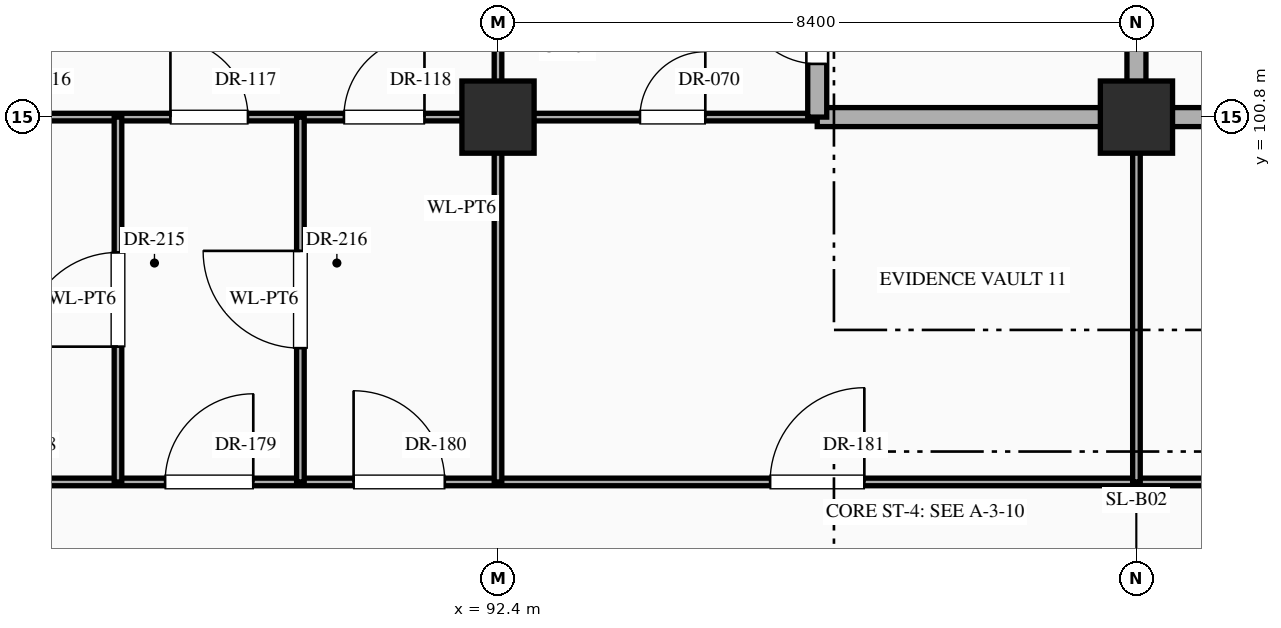
"""IFC4 building model, lengths in metres.
Left out: names, types, materials, properties, quantities, classifications, styles, units other than length and angle.
Written with IfcOpenShell. Run it as: python <this file> out.ifc"""

import sys

from ifc_helpers import new_model, si_unit, direction, frame, frame_2d, origin, origin_2d, place, context, subcontext, project, spatial, rectangle, extrude, element, fill, save


model = new_model("IFC4")
c1 = context("Model", 3, precision=1e-05, world=origin(), true_north=direction((0.0, 1.0)))
c2 = subcontext(c1, "Body", "Model", "MODEL_VIEW")
j1 = project(units=[si_unit("LENGTHUNIT", "METRE"), si_unit("PLANEANGLEUNIT", "RADIAN")], contexts=[c1])
p1 = place(None, origin())
s1 = spatial("IfcSite", under=j1, at=p1, CompositionType="ELEMENT")
p2 = place(p1, origin())
s2 = spatial("IfcBuilding", under=s1, at=p2, CompositionType="ELEMENT")
p3 = place(p2, frame((0.0, 0.0, -10.2)))
s3 = spatial("IfcBuildingStorey", under=s2, at=p3, CompositionType="ELEMENT", Elevation=-10.2)
for number, where, z_axis, x_axis in (
    (1, (92.4, 100.8, 0.0), (0.0, 0.0, 1.0), (1.0, 0.0, 0.0)),
    (2, (100.8, 100.8, 0.0), (0.0, 0.0, 1.0), (1.0, 0.0, 0.0)),
):
    element("IfcColumn", number, at=place(p3, frame(where, z_axis=z_axis, x_axis=x_axis)), inside=s3, PredefinedType="COLUMN", context=c2, shape_type="SweptSolid", body=[
        extrude(rectangle(XDim=0.95, YDim=0.95, at=origin_2d()), origin(), (0.0, 0.0, 1.0), 4.8),
    ])
p4 = place(p3, frame((0.04, 96.0, 0.0), z_axis=(0.0, 0.0, 1.0), x_axis=(1.0, 0.0, 0.0)))
e3 = element("IfcWall", 3, at=p4, inside=s3, PredefinedType="STANDARD", context=c2, shape_type="SweptSolid", body=[
    extrude(rectangle(XDim=151.16, YDim=0.1, at=frame_2d((75.58, 0.0))), origin(), (0.0, 0.0, 1.0), 4.48),
])
p5 = place(p4, frame((1.04, 0.0, 0.0)))
e4 = element("IfcOpeningElement", 4, at=p5, cuts=e3, PredefinedType="OPENING", context=c2, shape_type="SweptSolid", body=[
    extrude(rectangle(XDim=1.28, YDim=2.35, at=frame_2d((0.64, 1.175))), frame((0.0, 0.062, 0.0), z_axis=(0.0, -1.0, 0.0), x_axis=(1.0, 0.0, 0.0)), (0.0, 0.0, 1.0), 0.124),
])
p6 = place(p4, frame((4.09, 0.0, 0.0)))
e5 = element("IfcOpeningElement", 5, at=p6, cuts=e3, PredefinedType="OPENING", context=c2, shape_type="SweptSolid", body=[
    extrude(rectangle(XDim=0.94, YDim=2.3, at=frame_2d((0.47, 1.15))), frame((0.0, 0.062, 0.0), z_axis=(0.0, -1.0, 0.0), x_axis=(1.0, 0.0, 0.0)), (0.0, 0.0, 1.0), 0.124),
])
p7 = place(p4, frame((6.57, 0.0, 0.0)))
e6 = element("IfcOpeningElement", 6, at=p7, cuts=e3, PredefinedType="OPENING", context=c2, shape_type="SweptSolid", body=[
    extrude(rectangle(XDim=0.98, YDim=2.35, at=frame_2d((0.49, 1.175))), frame((0.0, 0.062, 0.0), z_axis=(0.0, -1.0, 0.0), x_axis=(1.0, 0.0, 0.0)), (0.0, 0.0, 1.0), 0.124),
])
p8 = place(p4, frame((12.05, 0.0, 0.0)))
e7 = element("IfcOpeningElement", 7, at=p8, cuts=e3, PredefinedType="OPENING", context=c2, shape_type="SweptSolid", body=[
    extrude(rectangle(XDim=1.02, YDim=2.4, at=frame_2d((0.51, 1.2))), frame((0.0, 0.062, 0.0), z_axis=(0.0, -1.0, 0.0), x_axis=(1.0, 0.0, 0.0)), (0.0, 0.0, 1.0), 0.124),
])
p9 = place(p4, frame((20.43, 0.0, 0.0)))
e8 = element("IfcOpeningElement", 8, at=p9, cuts=e3, PredefinedType="OPENING", context=c2, shape_type="SweptSolid", body=[
    extrude(rectangle(XDim=1.06, YDim=2.4, at=frame_2d((0.53, 1.2))), frame((0.0, 0.062, 0.0), z_axis=(0.0, -1.0, 0.0), x_axis=(1.0, 0.0, 0.0)), (0.0, 0.0, 1.0), 0.124),
])
p10 = place(p4, frame((26.29, 0.0, 0.0)))
e9 = element("IfcOpeningElement", 9, at=p10, cuts=e3, PredefinedType="OPENING", context=c2, shape_type="SweptSolid", body=[
    extrude(rectangle(XDim=1.14, YDim=2.4, at=frame_2d((0.57, 1.2))), frame((0.0, 0.062, 0.0), z_axis=(0.0, -1.0, 0.0), x_axis=(1.0, 0.0, 0.0)), (0.0, 0.0, 1.0), 0.124),
])
p11 = place(p4, frame((29.31, 0.0, 0.0)))
e10 = element("IfcOpeningElement", 10, at=p11, cuts=e3, PredefinedType="OPENING", context=c2, shape_type="SweptSolid", body=[
    extrude(rectangle(XDim=0.9, YDim=2.15, at=frame_2d((0.45, 1.075))), frame((0.0, 0.062, 0.0), z_axis=(0.0, -1.0, 0.0), x_axis=(1.0, 0.0, 0.0)), (0.0, 0.0, 1.0), 0.124),
])
p12 = place(p4, frame((31.83, 0.0, 0.0)))
e11 = element("IfcOpeningElement", 11, at=p12, cuts=e3, PredefinedType="OPENING", context=c2, shape_type="SweptSolid", body=[
    extrude(rectangle(XDim=0.86, YDim=2.1, at=frame_2d((0.43, 1.05))), frame((0.0, 0.062, 0.0), z_axis=(0.0, -1.0, 0.0), x_axis=(1.0, 0.0, 0.0)), (0.0, 0.0, 1.0), 0.124),
])
p13 = place(p4, frame((37.3, 0.0, 0.0)))
e12 = element("IfcOpeningElement", 12, at=p13, cuts=e3, PredefinedType="OPENING", context=c2, shape_type="SweptSolid", body=[
    extrude(rectangle(XDim=0.92, YDim=2.15, at=frame_2d((0.46, 1.075))), frame((0.0, 0.062, 0.0), z_axis=(0.0, -1.0, 0.0), x_axis=(1.0, 0.0, 0.0)), (0.0, 0.0, 1.0), 0.124),
])
p14 = place(p4, frame((45.68, 0.0, 0.0)))
e13 = element("IfcOpeningElement", 13, at=p14, cuts=e3, PredefinedType="OPENING", context=c2, shape_type="SweptSolid", body=[
    extrude(rectangle(XDim=0.96, YDim=2.2, at=frame_2d((0.48, 1.1))), frame((0.0, 0.062, 0.0), z_axis=(0.0, -1.0, 0.0), x_axis=(1.0, 0.0, 0.0)), (0.0, 0.0, 1.0), 0.124),
])
p15 = place(p4, frame((51.57, 0.0, 0.0)))
e14 = element("IfcOpeningElement", 14, at=p15, cuts=e3, PredefinedType="OPENING", context=c2, shape_type="SweptSolid", body=[
    extrude(rectangle(XDim=0.98, YDim=2.35, at=frame_2d((0.49, 1.175))), frame((0.0, 0.062, 0.0), z_axis=(0.0, -1.0, 0.0), x_axis=(1.0, 0.0, 0.0)), (0.0, 0.0, 1.0), 0.124),
])
p16 = place(p4, frame((54.45, 0.0, 0.0)))
e15 = element("IfcOpeningElement", 15, at=p16, cuts=e3, PredefinedType="OPENING", context=c2, shape_type="SweptSolid", body=[
    extrude(rectangle(XDim=1.02, YDim=2.4, at=frame_2d((0.51, 1.2))), frame((0.0, 0.062, 0.0), z_axis=(0.0, -1.0, 0.0), x_axis=(1.0, 0.0, 0.0)), (0.0, 0.0, 1.0), 0.124),
])
p17 = place(p4, frame((56.93, 0.0, 0.0)))
e16 = element("IfcOpeningElement", 16, at=p17, cuts=e3, PredefinedType="OPENING", context=c2, shape_type="SweptSolid", body=[
    extrude(rectangle(XDim=1.06, YDim=2.4, at=frame_2d((0.53, 1.2))), frame((0.0, 0.062, 0.0), z_axis=(0.0, -1.0, 0.0), x_axis=(1.0, 0.0, 0.0)), (0.0, 0.0, 1.0), 0.124),
])
p18 = place(p4, frame((62.39, 0.0, 0.0)))
e17 = element("IfcOpeningElement", 17, at=p18, cuts=e3, PredefinedType="OPENING", context=c2, shape_type="SweptSolid", body=[
    extrude(rectangle(XDim=1.14, YDim=2.4, at=frame_2d((0.57, 1.2))), frame((0.0, 0.062, 0.0), z_axis=(0.0, -1.0, 0.0), x_axis=(1.0, 0.0, 0.0)), (0.0, 0.0, 1.0), 0.124),
])
p19 = place(p4, frame((70.91, 0.0, 0.0)))
e18 = element("IfcOpeningElement", 18, at=p19, cuts=e3, PredefinedType="OPENING", context=c2, shape_type="SweptSolid", body=[
    extrude(rectangle(XDim=0.9, YDim=2.15, at=frame_2d((0.45, 1.075))), frame((0.0, 0.062, 0.0), z_axis=(0.0, -1.0, 0.0), x_axis=(1.0, 0.0, 0.0)), (0.0, 0.0, 1.0), 0.124),
])
p20 = place(p4, frame((79.33, 0.0, 0.0)))
e19 = element("IfcOpeningElement", 19, at=p20, cuts=e3, PredefinedType="OPENING", context=c2, shape_type="SweptSolid", body=[
    extrude(rectangle(XDim=0.86, YDim=2.1, at=frame_2d((0.43, 1.05))), frame((0.0, 0.062, 0.0), z_axis=(0.0, -1.0, 0.0), x_axis=(1.0, 0.0, 0.0)), (0.0, 0.0, 1.0), 0.124),
])
p21 = place(p4, frame((85.1, 0.0, 0.0)))
e20 = element("IfcOpeningElement", 20, at=p21, cuts=e3, PredefinedType="OPENING", context=c2, shape_type="SweptSolid", body=[
    extrude(rectangle(XDim=1.12, YDim=2.25, at=frame_2d((0.56, 1.125))), frame((0.0, 0.062, 0.0), z_axis=(0.0, -1.0, 0.0), x_axis=(1.0, 0.0, 0.0)), (0.0, 0.0, 1.0), 0.124),
])
p22 = place(p4, frame((87.98, 0.0, 0.0)))
e21 = element("IfcOpeningElement", 21, at=p22, cuts=e3, PredefinedType="OPENING", context=c2, shape_type="SweptSolid", body=[
    extrude(rectangle(XDim=1.16, YDim=2.3, at=frame_2d((0.58, 1.15))), frame((0.0, 0.062, 0.0), z_axis=(0.0, -1.0, 0.0), x_axis=(1.0, 0.0, 0.0)), (0.0, 0.0, 1.0), 0.124),
])
p23 = place(p4, frame((90.46, 0.0, 0.0)))
e22 = element("IfcOpeningElement", 22, at=p23, cuts=e3, PredefinedType="OPENING", context=c2, shape_type="SweptSolid", body=[
    extrude(rectangle(XDim=1.2, YDim=2.35, at=frame_2d((0.6, 1.175))), frame((0.0, 0.062, 0.0), z_axis=(0.0, -1.0, 0.0), x_axis=(1.0, 0.0, 0.0)), (0.0, 0.0, 1.0), 0.124),
])
p24 = place(p4, frame((95.94, 0.0, 0.0)))
e23 = element("IfcOpeningElement", 23, at=p24, cuts=e3, PredefinedType="OPENING", context=c2, shape_type="SweptSolid", body=[
    extrude(rectangle(XDim=1.24, YDim=2.3, at=frame_2d((0.62, 1.15))), frame((0.0, 0.062, 0.0), z_axis=(0.0, -1.0, 0.0), x_axis=(1.0, 0.0, 0.0)), (0.0, 0.0, 1.0), 0.124),
])
p25 = place(p4, frame((104.32, 0.0, 0.0)))
e24 = element("IfcOpeningElement", 24, at=p25, cuts=e3, PredefinedType="OPENING", context=c2, shape_type="SweptSolid", body=[
    extrude(rectangle(XDim=1.28, YDim=2.35, at=frame_2d((0.64, 1.175))), frame((0.0, 0.062, 0.0), z_axis=(0.0, -1.0, 0.0), x_axis=(1.0, 0.0, 0.0)), (0.0, 0.0, 1.0), 0.124),
])
p26 = place(p4, frame((110.39, 0.0, 0.0)))
e25 = element("IfcOpeningElement", 25, at=p26, cuts=e3, PredefinedType="OPENING", context=c2, shape_type="SweptSolid", body=[
    extrude(rectangle(XDim=0.94, YDim=2.3, at=frame_2d((0.47, 1.15))), frame((0.0, 0.062, 0.0), z_axis=(0.0, -1.0, 0.0), x_axis=(1.0, 0.0, 0.0)), (0.0, 0.0, 1.0), 0.124),
])
p27 = place(p4, frame((113.27, 0.0, 0.0)))
e26 = element("IfcOpeningElement", 26, at=p27, cuts=e3, PredefinedType="OPENING", context=c2, shape_type="SweptSolid", body=[
    extrude(rectangle(XDim=0.98, YDim=2.35, at=frame_2d((0.49, 1.175))), frame((0.0, 0.062, 0.0), z_axis=(0.0, -1.0, 0.0), x_axis=(1.0, 0.0, 0.0)), (0.0, 0.0, 1.0), 0.124),
])
p28 = place(p4, frame((115.75, 0.0, 0.0)))
e27 = element("IfcOpeningElement", 27, at=p28, cuts=e3, PredefinedType="OPENING", context=c2, shape_type="SweptSolid", body=[
    extrude(rectangle(XDim=1.02, YDim=2.4, at=frame_2d((0.51, 1.2))), frame((0.0, 0.062, 0.0), z_axis=(0.0, -1.0, 0.0), x_axis=(1.0, 0.0, 0.0)), (0.0, 0.0, 1.0), 0.124),
])
p29 = place(p4, frame((121.24, 0.0, 0.0)))
e28 = element("IfcOpeningElement", 28, at=p29, cuts=e3, PredefinedType="OPENING", context=c2, shape_type="SweptSolid", body=[
    extrude(rectangle(XDim=1.04, YDim=2.2, at=frame_2d((0.52, 1.1))), frame((0.0, 0.062, 0.0), z_axis=(0.0, -1.0, 0.0), x_axis=(1.0, 0.0, 0.0)), (0.0, 0.0, 1.0), 0.124),
])
p30 = place(p4, frame((129.62, 0.0, 0.0)))
e29 = element("IfcOpeningElement", 29, at=p30, cuts=e3, PredefinedType="OPENING", context=c2, shape_type="SweptSolid", body=[
    extrude(rectangle(XDim=1.08, YDim=2.25, at=frame_2d((0.54, 1.125))), frame((0.0, 0.062, 0.0), z_axis=(0.0, -1.0, 0.0), x_axis=(1.0, 0.0, 0.0)), (0.0, 0.0, 1.0), 0.124),
])
p31 = place(p4, frame((135.5, 0.0, 0.0)))
e30 = element("IfcOpeningElement", 30, at=p31, cuts=e3, PredefinedType="OPENING", context=c2, shape_type="SweptSolid", body=[
    extrude(rectangle(XDim=1.12, YDim=2.25, at=frame_2d((0.56, 1.125))), frame((0.0, 0.062, 0.0), z_axis=(0.0, -1.0, 0.0), x_axis=(1.0, 0.0, 0.0)), (0.0, 0.0, 1.0), 0.124),
])
p32 = place(p4, frame((138.38, 0.0, 0.0)))
e31 = element("IfcOpeningElement", 31, at=p32, cuts=e3, PredefinedType="OPENING", context=c2, shape_type="SweptSolid", body=[
    extrude(rectangle(XDim=1.16, YDim=2.3, at=frame_2d((0.58, 1.15))), frame((0.0, 0.062, 0.0), z_axis=(0.0, -1.0, 0.0), x_axis=(1.0, 0.0, 0.0)), (0.0, 0.0, 1.0), 0.124),
])
p33 = place(p4, frame((140.86, 0.0, 0.0)))
e32 = element("IfcOpeningElement", 32, at=p33, cuts=e3, PredefinedType="OPENING", context=c2, shape_type="SweptSolid", body=[
    extrude(rectangle(XDim=1.2, YDim=2.35, at=frame_2d((0.6, 1.175))), frame((0.0, 0.062, 0.0), z_axis=(0.0, -1.0, 0.0), x_axis=(1.0, 0.0, 0.0)), (0.0, 0.0, 1.0), 0.124),
])
p34 = place(p4, frame((146.34, 0.0, 0.0)))
e33 = element("IfcOpeningElement", 33, at=p34, cuts=e3, PredefinedType="OPENING", context=c2, shape_type="SweptSolid", body=[
    extrude(rectangle(XDim=1.24, YDim=2.3, at=frame_2d((0.62, 1.15))), frame((0.0, 0.062, 0.0), z_axis=(0.0, -1.0, 0.0), x_axis=(1.0, 0.0, 0.0)), (0.0, 0.0, 1.0), 0.124),
])
p35 = place(p3, frame((71.4, 100.8, 0.0), z_axis=(0.0, 0.0, 1.0), x_axis=(1.0, 0.0, 0.0)))
e34 = element("IfcWall", 34, at=p35, inside=s3, PredefinedType="STANDARD", context=c2, shape_type="SweptSolid", body=[
    extrude(rectangle(XDim=25.2, YDim=0.1, at=frame_2d((12.6, 0.0))), origin(), (0.0, 0.0, 1.0), 3.63),
])
p36 = place(p35, frame((1.413, 0.0, 0.0)))
e35 = element("IfcOpeningElement", 35, at=p36, cuts=e34, PredefinedType="OPENING", context=c2, shape_type="SweptSolid", body=[
    extrude(rectangle(XDim=0.98, YDim=2.35, at=frame_2d((0.49, 1.175))), frame((0.0, 0.062, 0.0), z_axis=(0.0, -1.0, 0.0), x_axis=(1.0, 0.0, 0.0)), (0.0, 0.0, 1.0), 0.124),
])
p37 = place(p35, frame((22.867, 0.0, 0.0)))
e36 = element("IfcOpeningElement", 36, at=p37, cuts=e34, PredefinedType="OPENING", context=c2, shape_type="SweptSolid", body=[
    extrude(rectangle(XDim=0.86, YDim=2.1, at=frame_2d((0.43, 1.05))), frame((0.0, 0.062, 0.0), z_axis=(0.0, -1.0, 0.0), x_axis=(1.0, 0.0, 0.0)), (0.0, 0.0, 1.0), 0.124),
])
p38 = place(p35, frame((7.84, 0.0, 0.0)))
e37 = element("IfcOpeningElement", 37, at=p38, cuts=e34, PredefinedType="OPENING", context=c2, shape_type="SweptSolid", body=[
    extrude(rectangle(XDim=1.12, YDim=2.25, at=frame_2d((0.56, 1.125))), frame((0.0, 0.062, 0.0), z_axis=(0.0, -1.0, 0.0), x_axis=(1.0, 0.0, 0.0)), (0.0, 0.0, 1.0), 0.124),
])
p39 = place(p35, frame((14.008, 0.0, 0.0)))
e38 = element("IfcOpeningElement", 38, at=p39, cuts=e34, PredefinedType="OPENING", context=c2, shape_type="SweptSolid", body=[
    extrude(rectangle(XDim=0.98, YDim=2.35, at=frame_2d((0.49, 1.175))), frame((0.0, 0.062, 0.0), z_axis=(0.0, -1.0, 0.0), x_axis=(1.0, 0.0, 0.0)), (0.0, 0.0, 1.0), 0.124),
])
p40 = place(p35, frame((16.69, 0.0, 0.0)))
e39 = element("IfcOpeningElement", 39, at=p40, cuts=e34, PredefinedType="OPENING", context=c2, shape_type="SweptSolid", body=[
    extrude(rectangle(XDim=1.02, YDim=2.4, at=frame_2d((0.51, 1.2))), frame((0.0, 0.062, 0.0), z_axis=(0.0, -1.0, 0.0), x_axis=(1.0, 0.0, 0.0)), (0.0, 0.0, 1.0), 0.124),
])
p41 = place(p35, frame((18.972, 0.0, 0.0)))
e40 = element("IfcOpeningElement", 40, at=p41, cuts=e34, PredefinedType="OPENING", context=c2, shape_type="SweptSolid", body=[
    extrude(rectangle(XDim=1.06, YDim=2.4, at=frame_2d((0.53, 1.2))), frame((0.0, 0.062, 0.0), z_axis=(0.0, -1.0, 0.0), x_axis=(1.0, 0.0, 0.0)), (0.0, 0.0, 1.0), 0.124),
])
p42 = place(p3, frame((96.6, 100.8, 0.0), z_axis=(0.0, 0.0, 1.0), x_axis=(1.0, 0.0, 0.0)))
e41 = element("IfcWall", 41, at=p42, inside=s3, PredefinedType="STANDARD", context=c2, shape_type="SweptSolid", body=[
    extrude(rectangle(XDim=12.6, YDim=0.25, at=frame_2d((6.3, 0.0))), origin(), (0.0, 0.0, 1.0), 3.63),
])
p43 = place(p42, frame((7.9, 0.0, 0.0)))
e42 = element("IfcOpeningElement", 42, at=p43, cuts=e41, PredefinedType="OPENING", context=c2, shape_type="SweptSolid", body=[
    extrude(rectangle(XDim=1.0, YDim=2.2, at=frame_2d((0.5, 1.1))), frame((0.0, 0.137, 0.0), z_axis=(0.0, -1.0, 0.0), x_axis=(1.0, 0.0, 0.0)), (0.0, 0.0, 1.0), 0.274),
])
p44 = place(p3, frame((87.4, 96.0, 0.0), z_axis=(0.0, 0.0, 1.0), x_axis=(0.0, 1.0, 0.0)))
e43 = element("IfcWall", 43, at=p44, inside=s3, PredefinedType="STANDARD", context=c2, shape_type="SweptSolid", body=[
    extrude(rectangle(XDim=4.8, YDim=0.1, at=frame_2d((2.4, 0.0))), origin(), (0.0, 0.0, 1.0), 4.48),
])
p45 = place(p44, frame((1.78, 0.0, 0.0)))
e44 = element("IfcOpeningElement", 44, at=p45, cuts=e43, PredefinedType="OPENING", context=c2, shape_type="SweptSolid", body=[
    extrude(rectangle(XDim=1.24, YDim=2.3, at=frame_2d((0.62, 1.15))), frame((0.0, 0.062, 0.0), z_axis=(0.0, -1.0, 0.0), x_axis=(1.0, 0.0, 0.0)), (0.0, 0.0, 1.0), 0.124),
])
p46 = place(p3, frame((89.8, 96.0, 0.0), z_axis=(0.0, 0.0, 1.0), x_axis=(0.0, 1.0, 0.0)))
e45 = element("IfcWall", 45, at=p46, inside=s3, PredefinedType="STANDARD", context=c2, shape_type="SweptSolid", body=[
    extrude(rectangle(XDim=4.8, YDim=0.1, at=frame_2d((2.4, 0.0))), origin(), (0.0, 0.0, 1.0), 4.48),
])
p47 = place(p46, frame((1.76, 0.0, 0.0)))
e46 = element("IfcOpeningElement", 46, at=p47, cuts=e45, PredefinedType="OPENING", context=c2, shape_type="SweptSolid", body=[
    extrude(rectangle(XDim=1.28, YDim=2.35, at=frame_2d((0.64, 1.175))), frame((0.0, 0.062, 0.0), z_axis=(0.0, -1.0, 0.0), x_axis=(1.0, 0.0, 0.0)), (0.0, 0.0, 1.0), 0.124),
])
p48 = place(p3, frame((92.4, 96.0, 0.0), z_axis=(0.0, 0.0, 1.0), x_axis=(0.0, 1.0, 0.0)))
e47 = element("IfcWall", 47, at=p48, inside=s3, PredefinedType="STANDARD", context=c2, shape_type="SweptSolid", body=[
    extrude(rectangle(XDim=7.2, YDim=0.1, at=frame_2d((3.6, 0.0))), origin(), (0.0, 0.0, 1.0), 3.73),
])
p49 = place(p48, frame((5.748, 0.0, 0.0)))
e48 = element("IfcOpeningElement", 48, at=p49, cuts=e47, PredefinedType="OPENING", context=c2, shape_type="SweptSolid", body=[
    extrude(rectangle(XDim=0.9, YDim=2.15, at=frame_2d((0.45, 1.075))), frame((0.0, 0.062, 0.0), z_axis=(0.0, -1.0, 0.0), x_axis=(1.0, 0.0, 0.0)), (0.0, 0.0, 1.0), 0.124),
])
p50 = place(p3, frame((96.6, 100.8, 0.0), z_axis=(0.0, 0.0, 1.0), x_axis=(0.0, 1.0, 0.0)))
e49 = element("IfcWall", 49, at=p50, inside=s3, PredefinedType="STANDARD", context=c2, shape_type="SweptSolid", body=[
    extrude(rectangle(XDim=3.6, YDim=0.25, at=frame_2d((1.8, 0.0))), origin(), (0.0, 0.0, 1.0), 4.48),
])
p51 = place(p50, frame((0.7, 0.0, 0.0)))
e50 = element("IfcOpeningElement", 50, at=p51, cuts=e49, PredefinedType="OPENING", context=c2, shape_type="SweptSolid", body=[
    extrude(rectangle(XDim=1.0, YDim=2.2, at=frame_2d((0.5, 1.1))), frame((0.0, 0.137, 0.0), z_axis=(0.0, -1.0, 0.0), x_axis=(1.0, 0.0, 0.0)), (0.0, 0.0, 1.0), 0.274),
])
p52 = place(p3, frame((100.8, 96.0, 0.0), z_axis=(0.0, 0.0, 1.0), x_axis=(0.0, 1.0, 0.0)))
e51 = element("IfcWall", 51, at=p52, inside=s3, PredefinedType="STANDARD", context=c2, shape_type="SweptSolid", body=[
    extrude(rectangle(XDim=4.8, YDim=0.1, at=frame_2d((2.4, 0.0))), origin(), (0.0, 0.0, 1.0), 3.73),
])
p53 = place(p3, frame((100.8, 100.8, 0.0), z_axis=(0.0, 0.0, 1.0), x_axis=(0.0, 1.0, 0.0)))
e52 = element("IfcWall", 52, at=p53, inside=s3, PredefinedType="STANDARD", context=c2, shape_type="SweptSolid", body=[
    extrude(rectangle(XDim=2.4, YDim=0.25, at=frame_2d((1.2, 0.0))), origin(), (0.0, 0.0, 1.0), 3.73),
])
p54 = place(p53, frame((0.923, 0.0, 0.0)))
e53 = element("IfcOpeningElement", 53, at=p54, cuts=e52, PredefinedType="OPENING", context=c2, shape_type="SweptSolid", body=[
    extrude(rectangle(XDim=0.95, YDim=2.15, at=frame_2d((0.475, 1.075))), frame((0.0, 0.137, 0.0), z_axis=(0.0, -1.0, 0.0), x_axis=(1.0, 0.0, 0.0)), (0.0, 0.0, 1.0), 0.274),
])
p55 = place(p51, origin())
e54 = element("IfcDoor", 54, at=p55, inside=s3, OperationType="SINGLE_SWING_RIGHT", PredefinedType="DOOR", context=c2, shape_type="SweptSolid", body=[
    extrude(rectangle(XDim=1.0, YDim=2.2, at=frame_2d((0.5, 1.1))), frame((0.0, 0.025, 0.0), z_axis=(0.0, -1.0, 0.0), x_axis=(1.0, 0.0, 0.0)), (0.0, 0.0, 1.0), 0.05),
])
fill(e50, e54)
p56 = place(p37, origin())
e55 = element("IfcDoor", 55, at=p56, inside=s3, OperationType="SINGLE_SWING_RIGHT", PredefinedType="DOOR", context=c2, shape_type="SweptSolid", body=[
    extrude(rectangle(XDim=0.86, YDim=2.1, at=frame_2d((0.43, 1.05))), frame((0.0, 0.025, 0.0), z_axis=(0.0, -1.0, 0.0), x_axis=(1.0, 0.0, 0.0)), (0.0, 0.0, 1.0), 0.05),
])
fill(e36, e55)
p57 = place(p40, origin())
e56 = element("IfcDoor", 56, at=p57, inside=s3, OperationType="SINGLE_SWING_LEFT", PredefinedType="DOOR", context=c2, shape_type="SweptSolid", body=[
    extrude(rectangle(XDim=1.02, YDim=2.4, at=frame_2d((0.51, 1.2))), frame((0.0, 0.025, 0.0), z_axis=(0.0, -1.0, 0.0), x_axis=(1.0, 0.0, 0.0)), (0.0, 0.0, 1.0), 0.05),
])
fill(e39, e56)
p58 = place(p41, origin())
e57 = element("IfcDoor", 57, at=p58, inside=s3, OperationType="SINGLE_SWING_RIGHT", PredefinedType="DOOR", context=c2, shape_type="SweptSolid", body=[
    extrude(rectangle(XDim=1.06, YDim=2.4, at=frame_2d((0.53, 1.2))), frame((0.0, 0.025, 0.0), z_axis=(0.0, -1.0, 0.0), x_axis=(1.0, 0.0, 0.0)), (0.0, 0.0, 1.0), 0.05),
])
fill(e40, e57)
p59 = place(p22, origin())
e58 = element("IfcDoor", 58, at=p59, inside=s3, OperationType="SINGLE_SWING_RIGHT", PredefinedType="DOOR", context=c2, shape_type="SweptSolid", body=[
    extrude(rectangle(XDim=1.16, YDim=2.3, at=frame_2d((0.58, 1.15))), frame((0.0, 0.025, 0.0), z_axis=(0.0, -1.0, 0.0), x_axis=(1.0, 0.0, 0.0)), (0.0, 0.0, 1.0), 0.05),
])
fill(e21, e58)
p60 = place(p23, origin())
e59 = element("IfcDoor", 59, at=p60, inside=s3, OperationType="SINGLE_SWING_LEFT", PredefinedType="DOOR", context=c2, shape_type="SweptSolid", body=[
    extrude(rectangle(XDim=1.2, YDim=2.35, at=frame_2d((0.6, 1.175))), frame((0.0, 0.025, 0.0), z_axis=(0.0, -1.0, 0.0), x_axis=(1.0, 0.0, 0.0)), (0.0, 0.0, 1.0), 0.05),
])
fill(e22, e59)
p61 = place(p24, origin())
e60 = element("IfcDoor", 60, at=p61, inside=s3, OperationType="SINGLE_SWING_RIGHT", PredefinedType="DOOR", context=c2, shape_type="SweptSolid", body=[
    extrude(rectangle(XDim=1.24, YDim=2.3, at=frame_2d((0.62, 1.15))), frame((0.0, 0.025, 0.0), z_axis=(0.0, -1.0, 0.0), x_axis=(1.0, 0.0, 0.0)), (0.0, 0.0, 1.0), 0.05),
])
fill(e23, e60)
p62 = place(p45, origin())
e61 = element("IfcDoor", 61, at=p62, inside=s3, OperationType="SINGLE_SWING_LEFT", PredefinedType="DOOR", context=c2, shape_type="SweptSolid", body=[
    extrude(rectangle(XDim=1.24, YDim=2.3, at=frame_2d((0.62, 1.15))), frame((0.0, 0.025, 0.0), z_axis=(0.0, -1.0, 0.0), x_axis=(1.0, 0.0, 0.0)), (0.0, 0.0, 1.0), 0.05),
])
fill(e44, e61)
p63 = place(p47, origin())
e62 = element("IfcDoor", 62, at=p63, inside=s3, OperationType="SINGLE_SWING_RIGHT", PredefinedType="DOOR", context=c2, shape_type="SweptSolid", body=[
    extrude(rectangle(XDim=1.28, YDim=2.35, at=frame_2d((0.64, 1.175))), frame((0.0, 0.025, 0.0), z_axis=(0.0, -1.0, 0.0), x_axis=(1.0, 0.0, 0.0)), (0.0, 0.0, 1.0), 0.05),
])
fill(e46, e62)
save(model, sys.argv[1])
